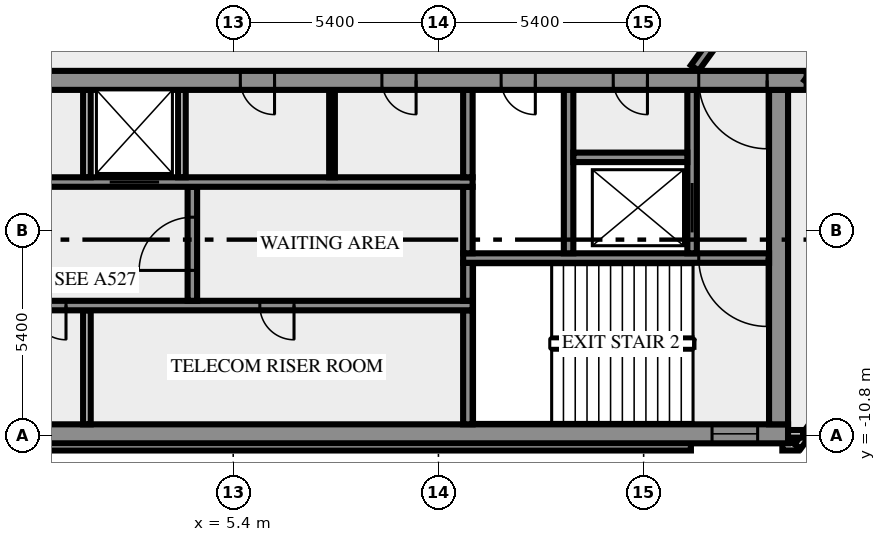
"""IFC4 building model, lengths in metres.
Left out: names, types, materials, properties, quantities, classifications, styles, units other than length and angle.
Written with IfcOpenShell. Run it as: python <this file> out.ifc"""

import sys

from ifc_helpers import new_model, si_unit, direction, frame, frame_2d, origin, place, context, subcontext, project, spatial, rectangle, extrude, element, fill, save


model = new_model("IFC4")
c1 = context("Model", 3, precision=1e-05, world=origin(), true_north=direction((0.0, 1.0)))
c2 = subcontext(c1, "Body", "Model", "MODEL_VIEW")
j1 = project(units=[si_unit("LENGTHUNIT", "METRE"), si_unit("PLANEANGLEUNIT", "RADIAN")], contexts=[c1])
p1 = place(None, origin())
s1 = spatial("IfcSite", under=j1, at=p1, CompositionType="ELEMENT")
p2 = place(p1, origin())
s2 = spatial("IfcBuilding", under=s1, at=p2, CompositionType="ELEMENT")
p3 = place(p2, frame((0.0, 0.0, 347.0)))
s3 = spatial("IfcBuildingStorey", under=s2, at=p3, CompositionType="ELEMENT", Elevation=347.0)
p4 = place(p3, frame((-17.444, -11.088, 0.0), z_axis=(0.0, 0.0, 1.0), x_axis=(1.0, 0.0, 0.0)))
e1 = element("IfcWall", 1, at=p4, inside=s3, PredefinedType="SOLIDWALL", context=c2, shape_type="SweptSolid", body=[
    extrude(rectangle(XDim=34.888, YDim=0.2, at=frame_2d((17.444, 0.0))), origin(), (0.0, 0.0, 1.0), 3.65),
])
p5 = place(p3, frame((19.85, -11.088, 0.0), z_axis=(0.0, 0.0, 1.0), x_axis=(1.0, 0.0, 0.0)))
e2 = element("IfcWall", 2, at=p5, inside=s3, PredefinedType="SOLIDWALL", context=c2, shape_type="SweptSolid", body=[
    extrude(rectangle(XDim=0.406, YDim=0.2, at=frame_2d((0.203, 0.0))), origin(), (0.0, 0.0, 1.0), 3.65),
])
p6 = place(p3, frame((20.253, -11.083, 0.0), z_axis=(0.0, 0.0, 1.0), x_axis=(0.587766567315, 0.809030569476, 0.0)))
e3 = element("IfcWall", 3, at=p6, inside=s3, PredefinedType="SOLIDWALL", context=c2, shape_type="SweptSolid", body=[
    extrude(rectangle(XDim=2.688, YDim=0.2, at=frame_2d((1.344, 0.0))), origin(), (0.0, 0.0, 1.0), 3.65),
])
p7 = place(p3, frame((19.98, -10.75, 0.0), z_axis=(0.0, 0.0, 1.0), x_axis=(1.0, 0.0, 0.0)))
e4 = element("IfcWall", 4, at=p7, inside=s3, PredefinedType="SOLIDWALL", context=c2, shape_type="SweptSolid", body=[
    extrude(rectangle(XDim=0.417, YDim=0.2, at=frame_2d((0.208, 0.0))), origin(), (0.0, 0.0, 1.0), 3.65),
])
p8 = place(p3, frame((-20.0, -10.75, 0.0), z_axis=(0.0, 0.0, 1.0), x_axis=(1.0, 0.0, 0.0)))
e5 = element("IfcWall", 5, at=p8, inside=s3, PredefinedType="SHEAR", context=c2, shape_type="SweptSolid", body=[
    extrude(rectangle(XDim=40.0, YDim=0.5, at=frame_2d((20.0, 0.0))), origin(), (0.0, 0.0, 1.0), 3.65),
])
p9 = place(p8, frame((0.8, 0.0, 1.0)))
e6 = element("IfcOpeningElement", 6, at=p9, cuts=e5, PredefinedType="OPENING", context=c2, shape_type="SweptSolid", body=[
    extrude(rectangle(XDim=1.2, YDim=1.2, at=frame_2d((0.6, 0.6))), frame((0.0, 0.26, 0.0), z_axis=(0.0, -1.0, 0.0), x_axis=(1.0, 0.0, 0.0)), (0.0, 0.0, 1.0), 0.52),
])
p10 = place(p8, frame((38.0, 0.0, 1.0)))
e7 = element("IfcOpeningElement", 7, at=p10, cuts=e5, PredefinedType="OPENING", context=c2, shape_type="SweptSolid", body=[
    extrude(rectangle(XDim=1.2, YDim=1.2, at=frame_2d((0.6, 0.6))), frame((0.0, 0.26, 0.0), z_axis=(0.0, -1.0, 0.0), x_axis=(1.0, 0.0, 0.0)), (0.0, 0.0, 1.0), 0.52),
])
p11 = place(p3, frame((1.55, -10.5, 0.0), z_axis=(0.0, 0.0, 1.0), x_axis=(0.0, 1.0, 0.0)))
e8 = element("IfcWall", 8, at=p11, inside=s3, PredefinedType="SOLIDWALL", context=c2, shape_type="SweptSolid", body=[
    extrude(rectangle(XDim=3.0, YDim=0.2, at=frame_2d((1.5, 0.0))), origin(), (0.0, 0.0, 1.0), 3.65),
])
p12 = place(p3, frame((11.575, -10.5, 0.0), z_axis=(0.0, 0.0, 1.0), x_axis=(0.0, 1.0, 0.0)))
e9 = element("IfcWall", 9, at=p12, inside=s3, PredefinedType="SHEAR", context=c2, shape_type="SweptSolid", body=[
    extrude(rectangle(XDim=3.0, YDim=0.25, at=frame_2d((1.5, 0.0))), origin(), (0.0, 0.0, 1.0), 3.65),
])
p13 = place(p3, frame((19.75, -10.5, 0.0), z_axis=(0.0, 0.0, 1.0), x_axis=(0.0, 1.0, 0.0)))
e10 = element("IfcWall", 10, at=p13, inside=s3, PredefinedType="SHEAR", context=c2, shape_type="SweptSolid", body=[
    extrude(rectangle(XDim=8.8, YDim=0.5, at=frame_2d((4.4, 0.0))), origin(), (0.0, 0.0, 1.0), 3.65),
])
p14 = place(p3, frame((11.7, -7.375, 0.0), z_axis=(0.0, 0.0, 1.0), x_axis=(-1.0, 0.0, 0.0)))
e11 = element("IfcWall", 11, at=p14, inside=s3, PredefinedType="SHEAR", context=c2, shape_type="SweptSolid", body=[
    extrude(rectangle(XDim=23.4, YDim=0.25, at=frame_2d((11.7, 0.0))), origin(), (0.0, 0.0, 1.0), 3.65),
])
p15 = place(p14, frame((22.225, 0.0, 0.0)))
e12 = element("IfcOpeningElement", 12, at=p15, cuts=e11, PredefinedType="OPENING", context=c2, shape_type="SweptSolid", body=[
    extrude(rectangle(XDim=0.8, YDim=2.1, at=frame_2d((0.4, 1.05))), frame((0.0, 0.135, 0.0), z_axis=(0.0, -1.0, 0.0), x_axis=(1.0, 0.0, 0.0)), (0.0, 0.0, 1.0), 0.27),
])
p16 = place(p14, frame((20.2, 0.0, 0.0)))
e13 = element("IfcOpeningElement", 13, at=p16, cuts=e11, PredefinedType="OPENING", context=c2, shape_type="SweptSolid", body=[
    extrude(rectangle(XDim=1.1, YDim=2.1, at=frame_2d((0.55, 1.05))), frame((0.0, 0.135, 0.0), z_axis=(0.0, -1.0, 0.0), x_axis=(1.0, 0.0, 0.0)), (0.0, 0.0, 1.0), 0.27),
])
p17 = place(p14, frame((17.7, 0.0, 0.0)))
e14 = element("IfcOpeningElement", 14, at=p17, cuts=e11, PredefinedType="OPENING", context=c2, shape_type="SweptSolid", body=[
    extrude(rectangle(XDim=1.1, YDim=2.1, at=frame_2d((0.55, 1.05))), frame((0.0, 0.135, 0.0), z_axis=(0.0, -1.0, 0.0), x_axis=(1.0, 0.0, 0.0)), (0.0, 0.0, 1.0), 0.27),
])
p18 = place(p14, frame((15.975, 0.0, 0.0)))
e15 = element("IfcOpeningElement", 15, at=p18, cuts=e11, PredefinedType="OPENING", context=c2, shape_type="SweptSolid", body=[
    extrude(rectangle(XDim=0.8, YDim=2.1, at=frame_2d((0.4, 1.05))), frame((0.0, 0.135, 0.0), z_axis=(0.0, -1.0, 0.0), x_axis=(1.0, 0.0, 0.0)), (0.0, 0.0, 1.0), 0.27),
])
p19 = place(p14, frame((14.65, 0.0, 0.0)))
e16 = element("IfcOpeningElement", 16, at=p19, cuts=e11, PredefinedType="OPENING", context=c2, shape_type="SweptSolid", body=[
    extrude(rectangle(XDim=0.8, YDim=2.1, at=frame_2d((0.4, 1.05))), frame((0.0, 0.135, 0.0), z_axis=(0.0, -1.0, 0.0), x_axis=(1.0, 0.0, 0.0)), (0.0, 0.0, 1.0), 0.27),
])
p20 = place(p14, frame((12.8, 0.0, 0.0)))
e17 = element("IfcOpeningElement", 17, at=p20, cuts=e11, PredefinedType="OPENING", context=c2, shape_type="SweptSolid", body=[
    extrude(rectangle(XDim=0.9, YDim=2.1, at=frame_2d((0.45, 1.05))), frame((0.0, 0.135, 0.0), z_axis=(0.0, -1.0, 0.0), x_axis=(1.0, 0.0, 0.0)), (0.0, 0.0, 1.0), 0.27),
])
p21 = place(p14, frame((10.7, 0.0, 0.0)))
e18 = element("IfcOpeningElement", 18, at=p21, cuts=e11, PredefinedType="OPENING", context=c2, shape_type="SweptSolid", body=[
    extrude(rectangle(XDim=0.9, YDim=2.1, at=frame_2d((0.45, 1.05))), frame((0.0, 0.135, 0.0), z_axis=(0.0, -1.0, 0.0), x_axis=(1.0, 0.0, 0.0)), (0.0, 0.0, 1.0), 0.27),
])
p22 = place(p14, frame((4.7, 0.0, 0.0)))
e19 = element("IfcOpeningElement", 19, at=p22, cuts=e11, PredefinedType="OPENING", context=c2, shape_type="SweptSolid", body=[
    extrude(rectangle(XDim=0.9, YDim=2.1, at=frame_2d((0.45, 1.05))), frame((0.0, 0.135, 0.0), z_axis=(0.0, -1.0, 0.0), x_axis=(1.0, 0.0, 0.0)), (0.0, 0.0, 1.0), 0.27),
])
p23 = place(p3, frame((4.325, -7.25, 0.0), z_axis=(0.0, 0.0, 1.0), x_axis=(0.0, 1.0, 0.0)))
e20 = element("IfcWall", 20, at=p23, inside=s3, PredefinedType="SHEAR", context=c2, shape_type="SweptSolid", body=[
    extrude(rectangle(XDim=3.0, YDim=0.25, at=frame_2d((1.5, 0.0))), origin(), (0.0, 0.0, 1.0), 3.65),
])
p24 = place(p23, frame((0.8, 0.0, 0.0)))
e21 = element("IfcOpeningElement", 21, at=p24, cuts=e20, PredefinedType="OPENING", context=c2, shape_type="SweptSolid", body=[
    extrude(rectangle(XDim=1.4, YDim=2.1, at=frame_2d((0.7, 1.05))), frame((0.0, 0.135, 0.0), z_axis=(0.0, -1.0, 0.0), x_axis=(1.0, 0.0, 0.0)), (0.0, 0.0, 1.0), 0.27),
])
p25 = place(p3, frame((11.575, -7.25, 0.0), z_axis=(0.0, 0.0, 1.0), x_axis=(0.0, 1.0, 0.0)))
e22 = element("IfcWall", 22, at=p25, inside=s3, PredefinedType="SHEAR", context=c2, shape_type="SweptSolid", body=[
    extrude(rectangle(XDim=1.0, YDim=0.25, at=frame_2d((0.5, 0.0))), origin(), (0.0, 0.0, 1.0), 3.65),
])
p26 = place(p3, frame((19.5, -6.125, 0.0), z_axis=(0.0, 0.0, 1.0), x_axis=(-1.0, 0.0, 0.0)))
e23 = element("IfcWall", 23, at=p26, inside=s3, PredefinedType="SHEAR", context=c2, shape_type="SweptSolid", body=[
    extrude(rectangle(XDim=8.05, YDim=0.25, at=frame_2d((4.025, 0.0))), origin(), (0.0, 0.0, 1.0), 3.65),
])
p27 = place(p26, frame((0.05, 0.0, 0.0)))
e24 = element("IfcOpeningElement", 24, at=p27, cuts=e23, PredefinedType="OPENING", context=c2, shape_type="SweptSolid", body=[
    extrude(rectangle(XDim=1.8, YDim=2.1, at=frame_2d((0.9, 1.05))), frame((0.0, 0.135, 0.0), z_axis=(0.0, -1.0, 0.0), x_axis=(1.0, 0.0, 0.0)), (0.0, 0.0, 1.0), 0.27),
])
p28 = place(p3, frame((11.575, -6.0, 0.0), z_axis=(0.0, 0.0, 1.0), x_axis=(0.0, 1.0, 0.0)))
e25 = element("IfcWall", 25, at=p28, inside=s3, PredefinedType="SHEAR", context=c2, shape_type="SweptSolid", body=[
    extrude(rectangle(XDim=1.75, YDim=0.25, at=frame_2d((0.875, 0.0))), origin(), (0.0, 0.0, 1.0), 3.65),
])
p29 = place(p3, frame((14.225, -6.0, 0.0), z_axis=(0.0, 0.0, 1.0), x_axis=(0.0, 1.0, 0.0)))
e26 = element("IfcWall", 26, at=p29, inside=s3, PredefinedType="SHEAR", context=c2, shape_type="SweptSolid", body=[
    extrude(rectangle(XDim=4.3, YDim=0.25, at=frame_2d((2.15, 0.0))), origin(), (0.0, 0.0, 1.0), 3.65),
])
p30 = place(p3, frame((17.475, -6.0, 0.0), z_axis=(0.0, 0.0, 1.0), x_axis=(0.0, 1.0, 0.0)))
e27 = element("IfcWall", 27, at=p30, inside=s3, PredefinedType="SHEAR", context=c2, shape_type="SweptSolid", body=[
    extrude(rectangle(XDim=4.3, YDim=0.25, at=frame_2d((2.15, 0.0))), origin(), (0.0, 0.0, 1.0), 3.65),
])
p31 = place(p30, frame((0.55, 0.0, 0.0)))
e28 = element("IfcOpeningElement", 28, at=p31, cuts=e27, PredefinedType="OPENING", context=c2, shape_type="SweptSolid", body=[
    extrude(rectangle(XDim=1.3, YDim=2.1, at=frame_2d((0.65, 1.05))), frame((0.0, 0.135, 0.0), z_axis=(0.0, -1.0, 0.0), x_axis=(1.0, 0.0, 0.0)), (0.0, 0.0, 1.0), 0.27),
])
p32 = place(p3, frame((-0.6, -4.125, 0.0), z_axis=(0.0, 0.0, 1.0), x_axis=(1.0, 0.0, 0.0)))
e29 = element("IfcWall", 29, at=p32, inside=s3, PredefinedType="SHEAR", context=c2, shape_type="SweptSolid", body=[
    extrude(rectangle(XDim=12.3, YDim=0.25, at=frame_2d((6.15, 0.0))), origin(), (0.0, 0.0, 1.0), 3.65),
])
p33 = place(p32, frame((2.75, 0.0, 0.0)))
e30 = element("IfcOpeningElement", 30, at=p33, cuts=e29, PredefinedType="OPENING", context=c2, shape_type="SweptSolid", body=[
    extrude(rectangle(XDim=1.3, YDim=2.1, at=frame_2d((0.65, 1.05))), frame((0.0, 0.135, 0.0), z_axis=(0.0, -1.0, 0.0), x_axis=(1.0, 0.0, 0.0)), (0.0, 0.0, 1.0), 0.27),
])
for number, where, z_axis, x_axis in (
    (31, (1.55, -4.0, 0.0), (0.0, 0.0, 1.0), (0.0, 1.0, 0.0)),
    (32, (4.05, -4.0, 0.0), (0.0, 0.0, 1.0), (0.0, 1.0, 0.0)),
):
    element("IfcWall", number, at=place(p3, frame(where, z_axis=z_axis, x_axis=x_axis)), inside=s3, PredefinedType="SOLIDWALL", context=c2, shape_type="SweptSolid", body=[
        extrude(rectangle(XDim=2.3, YDim=0.2, at=frame_2d((1.15, 0.0))), origin(), (0.0, 0.0, 1.0), 3.65),
    ])
p34 = place(p3, frame((8.0, -4.0, 0.0), z_axis=(0.0, 0.0, 1.0), x_axis=(0.0, 1.0, 0.0)))
e33 = element("IfcWall", 33, at=p34, inside=s3, PredefinedType="PARTITIONING", context=c2, shape_type="SweptSolid", body=[
    extrude(rectangle(XDim=2.3, YDim=0.15, at=frame_2d((1.15, 0.0))), origin(), (0.0, 0.0, 1.0), 3.65),
])
p35 = place(p3, frame((11.575, -4.0, 0.0), z_axis=(0.0, 0.0, 1.0), x_axis=(0.0, 1.0, 0.0)))
e34 = element("IfcWall", 34, at=p35, inside=s3, PredefinedType="SHEAR", context=c2, shape_type="SweptSolid", body=[
    extrude(rectangle(XDim=2.3, YDim=0.25, at=frame_2d((1.15, 0.0))), origin(), (0.0, 0.0, 1.0), 3.65),
])
p36 = place(p3, frame((14.35, -3.475, 0.0), z_axis=(0.0, 0.0, 1.0), x_axis=(1.0, 0.0, 0.0)))
e35 = element("IfcWall", 35, at=p36, inside=s3, PredefinedType="SHEAR", context=c2, shape_type="SweptSolid", body=[
    extrude(rectangle(XDim=3.0, YDim=0.25, at=frame_2d((1.5, 0.0))), origin(), (0.0, 0.0, 1.0), 3.65),
])
p37 = place(p3, frame((20.49, -1.45, 0.0), z_axis=(0.0, 0.0, 1.0), x_axis=(-1.0, 0.0, 0.0)))
e36 = element("IfcWall", 36, at=p37, inside=s3, PredefinedType="SHEAR", context=c2, shape_type="SweptSolid", body=[
    extrude(rectangle(XDim=40.98, YDim=0.5, at=frame_2d((20.49, 0.0))), origin(), (0.0, 0.0, 1.0), 3.65),
])
p38 = place(p37, frame((38.14, 0.0, 0.0)))
e37 = element("IfcOpeningElement", 37, at=p38, cuts=e36, PredefinedType="OPENING", context=c2, shape_type="SweptSolid", body=[
    extrude(rectangle(XDim=1.8, YDim=2.1, at=frame_2d((0.9, 1.05))), frame((0.0, 0.26, 0.0), z_axis=(0.0, -1.0, 0.0), x_axis=(1.0, 0.0, 0.0)), (0.0, 0.0, 1.0), 0.52),
])
p39 = place(p37, frame((36.728, 0.0, 0.0)))
e38 = element("IfcOpeningElement", 38, at=p39, cuts=e36, PredefinedType="OPENING", context=c2, shape_type="SweptSolid", body=[
    extrude(rectangle(XDim=0.8, YDim=2.1, at=frame_2d((0.4, 1.05))), frame((0.0, 0.26, 0.0), z_axis=(0.0, -1.0, 0.0), x_axis=(1.0, 0.0, 0.0)), (0.0, 0.0, 1.0), 0.52),
])
p40 = place(p37, frame((35.153, 0.0, 0.0)))
e39 = element("IfcOpeningElement", 39, at=p40, cuts=e36, PredefinedType="OPENING", context=c2, shape_type="SweptSolid", body=[
    extrude(rectangle(XDim=0.8, YDim=2.1, at=frame_2d((0.4, 1.05))), frame((0.0, 0.26, 0.0), z_axis=(0.0, -1.0, 0.0), x_axis=(1.0, 0.0, 0.0)), (0.0, 0.0, 1.0), 0.52),
])
p41 = place(p37, frame((32.94, 0.0, 0.0)))
e40 = element("IfcOpeningElement", 40, at=p41, cuts=e36, PredefinedType="OPENING", context=c2, shape_type="SweptSolid", body=[
    extrude(rectangle(XDim=0.9, YDim=2.1, at=frame_2d((0.45, 1.05))), frame((0.0, 0.26, 0.0), z_axis=(0.0, -1.0, 0.0), x_axis=(1.0, 0.0, 0.0)), (0.0, 0.0, 1.0), 0.52),
])
p42 = place(p37, frame((31.015, 0.0, 0.0)))
e41 = element("IfcOpeningElement", 41, at=p42, cuts=e36, PredefinedType="OPENING", context=c2, shape_type="SweptSolid", body=[
    extrude(rectangle(XDim=0.8, YDim=2.1, at=frame_2d((0.4, 1.05))), frame((0.0, 0.26, 0.0), z_axis=(0.0, -1.0, 0.0), x_axis=(1.0, 0.0, 0.0)), (0.0, 0.0, 1.0), 0.52),
])
p43 = place(p37, frame((24.765, 0.0, 0.0)))
e42 = element("IfcOpeningElement", 42, at=p43, cuts=e36, PredefinedType="OPENING", context=c2, shape_type="SweptSolid", body=[
    extrude(rectangle(XDim=0.8, YDim=2.1, at=frame_2d((0.4, 1.05))), frame((0.0, 0.26, 0.0), z_axis=(0.0, -1.0, 0.0), x_axis=(1.0, 0.0, 0.0)), (0.0, 0.0, 1.0), 0.52),
])
p44 = place(p37, frame((21.765, 0.0, 0.0)))
e43 = element("IfcOpeningElement", 43, at=p44, cuts=e36, PredefinedType="OPENING", context=c2, shape_type="SweptSolid", body=[
    extrude(rectangle(XDim=2.0, YDim=2.1, at=frame_2d((1.0, 1.05))), frame((0.0, 0.26, 0.0), z_axis=(0.0, -1.0, 0.0), x_axis=(1.0, 0.0, 0.0)), (0.0, 0.0, 1.0), 0.52),
])
p45 = place(p37, frame((14.002, 0.0, 0.0)))
e44 = element("IfcOpeningElement", 44, at=p45, cuts=e36, PredefinedType="OPENING", context=c2, shape_type="SweptSolid", body=[
    extrude(rectangle(XDim=0.9, YDim=2.1, at=frame_2d((0.45, 1.05))), frame((0.0, 0.26, 0.0), z_axis=(0.0, -1.0, 0.0), x_axis=(1.0, 0.0, 0.0)), (0.0, 0.0, 1.0), 0.52),
])
p46 = place(p37, frame((10.278, 0.0, 0.0)))
e45 = element("IfcOpeningElement", 45, at=p46, cuts=e36, PredefinedType="OPENING", context=c2, shape_type="SweptSolid", body=[
    extrude(rectangle(XDim=0.9, YDim=2.1, at=frame_2d((0.45, 1.05))), frame((0.0, 0.26, 0.0), z_axis=(0.0, -1.0, 0.0), x_axis=(1.0, 0.0, 0.0)), (0.0, 0.0, 1.0), 0.52),
])
p47 = place(p37, frame((7.14, 0.0, 0.0)))
e46 = element("IfcOpeningElement", 46, at=p47, cuts=e36, PredefinedType="OPENING", context=c2, shape_type="SweptSolid", body=[
    extrude(rectangle(XDim=0.9, YDim=2.1, at=frame_2d((0.45, 1.05))), frame((0.0, 0.26, 0.0), z_axis=(0.0, -1.0, 0.0), x_axis=(1.0, 0.0, 0.0)), (0.0, 0.0, 1.0), 0.52),
])
p48 = place(p37, frame((4.19, 0.0, 0.0)))
e47 = element("IfcOpeningElement", 47, at=p48, cuts=e36, PredefinedType="OPENING", context=c2, shape_type="SweptSolid", body=[
    extrude(rectangle(XDim=0.9, YDim=2.1, at=frame_2d((0.45, 1.05))), frame((0.0, 0.26, 0.0), z_axis=(0.0, -1.0, 0.0), x_axis=(1.0, 0.0, 0.0)), (0.0, 0.0, 1.0), 0.52),
])
p49 = place(p37, frame((1.04, 0.0, 0.0)))
e48 = element("IfcOpeningElement", 48, at=p49, cuts=e36, PredefinedType="OPENING", context=c2, shape_type="SweptSolid", body=[
    extrude(rectangle(XDim=1.8, YDim=2.1, at=frame_2d((0.9, 1.05))), frame((0.0, 0.26, 0.0), z_axis=(0.0, -1.0, 0.0), x_axis=(1.0, 0.0, 0.0)), (0.0, 0.0, 1.0), 0.52),
])
p50 = place(p3, frame((17.545, -1.125, 0.0), z_axis=(0.0, 0.0, 1.0), x_axis=(0.58779555165, 0.809009511354, 0.0)))
e49 = element("IfcWall", 49, at=p50, inside=s3, PredefinedType="SOLIDWALL", context=c2, shape_type="SweptSolid", body=[
    extrude(rectangle(XDim=18.103, YDim=0.25, at=frame_2d((9.052, 0.0))), origin(), (0.0, 0.0, 1.0), 3.65),
])
p51 = place(p50, frame((16.728, 0.0, 0.0)))
e50 = element("IfcOpeningElement", 50, at=p51, cuts=e49, PredefinedType="OPENING", context=c2, shape_type="SweptSolid", body=[
    extrude(rectangle(XDim=0.9, YDim=2.1, at=frame_2d((0.45, 1.05))), frame((0.0, 0.135, 0.0), z_axis=(0.0, -1.0, 0.0), x_axis=(1.0, 0.0, 0.0)), (0.0, 0.0, 1.0), 0.27),
])
p52 = place(p3, frame((30.183, 11.761, 0.0), z_axis=(0.0, 0.0, 1.0), x_axis=(-0.587781762867, -0.80901952958, 0.0)))
e51 = element("IfcWall", 51, at=p52, inside=s3, PredefinedType="SOLIDWALL", context=c2, shape_type="SweptSolid", body=[
    extrude(rectangle(XDim=16.42, YDim=0.25, at=frame_2d((8.21, 0.0))), origin(), (0.0, 0.0, 1.0), 3.65),
])
p53 = place(p52, frame((0.225, 0.0, 0.0)))
e52 = element("IfcOpeningElement", 52, at=p53, cuts=e51, PredefinedType="OPENING", context=c2, shape_type="SweptSolid", body=[
    extrude(rectangle(XDim=0.9, YDim=2.1, at=frame_2d((0.45, 1.05))), frame((0.0, 0.135, 0.0), z_axis=(0.0, -1.0, 0.0), x_axis=(1.0, 0.0, 0.0)), (0.0, 0.0, 1.0), 0.27),
])
p54 = place(p52, frame((6.605, 0.0, 0.0)))
e53 = element("IfcOpeningElement", 53, at=p54, cuts=e51, PredefinedType="OPENING", context=c2, shape_type="SweptSolid", body=[
    extrude(rectangle(XDim=0.9, YDim=2.1, at=frame_2d((0.45, 1.05))), frame((0.0, 0.135, 0.0), z_axis=(0.0, -1.0, 0.0), x_axis=(1.0, 0.0, 0.0)), (0.0, 0.0, 1.0), 0.27),
])
p55 = place(p10, origin())
e54 = element("IfcWindow", 54, at=p55, inside=s3, PartitioningType="SINGLE_PANEL", PredefinedType="WINDOW", context=c2, shape_type="SweptSolid", body=[
    extrude(rectangle(XDim=1.2, YDim=1.2, at=frame_2d((0.6, 0.6))), frame((0.0, 0.03, 0.0), z_axis=(0.0, -1.0, 0.0), x_axis=(1.0, 0.0, 0.0)), (0.0, 0.0, 1.0), 0.06),
])
fill(e7, e54)
p56 = place(p21, origin())
e55 = element("IfcDoor", 55, at=p56, inside=s3, OperationType="SINGLE_SWING_LEFT", PredefinedType="DOOR", context=c2, shape_type="SweptSolid", body=[
    extrude(rectangle(XDim=0.9, YDim=2.1, at=frame_2d((0.45, 1.05))), frame((0.0, 0.025, 0.0), z_axis=(0.0, -1.0, 0.0), x_axis=(1.0, 0.0, 0.0)), (0.0, 0.0, 1.0), 0.05),
])
fill(e18, e55)
p57 = place(p22, origin())
e56 = element("IfcDoor", 56, at=p57, inside=s3, OperationType="SINGLE_SWING_LEFT", PredefinedType="DOOR", context=c2, shape_type="SweptSolid", body=[
    extrude(rectangle(XDim=0.9, YDim=2.1, at=frame_2d((0.45, 1.05))), frame((0.0, 0.025, 0.0), z_axis=(0.0, -1.0, 0.0), x_axis=(1.0, 0.0, 0.0)), (0.0, 0.0, 1.0), 0.05),
])
fill(e19, e56)
p58 = place(p24, origin())
e57 = element("IfcDoor", 57, at=p58, inside=s3, OperationType="DOUBLE_DOOR_SINGLE_SWING", PredefinedType="DOOR", context=c2, shape_type="SweptSolid", body=[
    extrude(rectangle(XDim=1.4, YDim=2.1, at=frame_2d((0.7, 1.05))), frame((0.0, 0.025, 0.0), z_axis=(0.0, -1.0, 0.0), x_axis=(1.0, 0.0, 0.0)), (0.0, 0.0, 1.0), 0.05),
])
fill(e21, e57)
p59 = place(p27, origin())
e58 = element("IfcDoor", 58, at=p59, inside=s3, OperationType="DOUBLE_DOOR_SINGLE_SWING", PredefinedType="DOOR", context=c2, shape_type="SweptSolid", body=[
    extrude(rectangle(XDim=1.8, YDim=2.1, at=frame_2d((0.9, 1.05))), frame((0.0, 0.025, 0.0), z_axis=(0.0, -1.0, 0.0), x_axis=(1.0, 0.0, 0.0)), (0.0, 0.0, 1.0), 0.05),
])
fill(e24, e58)
p60 = place(p31, origin())
e59 = element("IfcDoor", 59, at=p60, inside=s3, OperationType="DOUBLE_DOOR_SLIDING", PredefinedType="DOOR", context=c2, shape_type="SweptSolid", body=[
    extrude(rectangle(XDim=1.3, YDim=2.1, at=frame_2d((0.65, 1.05))), frame((0.0, 0.025, 0.0), z_axis=(0.0, -1.0, 0.0), x_axis=(1.0, 0.0, 0.0)), (0.0, 0.0, 1.0), 0.05),
])
fill(e28, e59)
p61 = place(p33, origin())
e60 = element("IfcDoor", 60, at=p61, inside=s3, OperationType="DOUBLE_DOOR_SLIDING", PredefinedType="DOOR", context=c2, shape_type="SweptSolid", body=[
    extrude(rectangle(XDim=1.3, YDim=2.1, at=frame_2d((0.65, 1.05))), frame((0.0, 0.025, 0.0), z_axis=(0.0, -1.0, 0.0), x_axis=(1.0, 0.0, 0.0)), (0.0, 0.0, 1.0), 0.05),
])
fill(e30, e60)
p62 = place(p45, origin())
e61 = element("IfcDoor", 61, at=p62, inside=s3, OperationType="SINGLE_SWING_LEFT", PredefinedType="DOOR", context=c2, shape_type="SweptSolid", body=[
    extrude(rectangle(XDim=0.9, YDim=2.1, at=frame_2d((0.45, 1.05))), frame((0.0, 0.025, 0.0), z_axis=(0.0, -1.0, 0.0), x_axis=(1.0, 0.0, 0.0)), (0.0, 0.0, 1.0), 0.05),
])
fill(e44, e61)
p63 = place(p46, origin())
e62 = element("IfcDoor", 62, at=p63, inside=s3, OperationType="SINGLE_SWING_LEFT", PredefinedType="DOOR", context=c2, shape_type="SweptSolid", body=[
    extrude(rectangle(XDim=0.9, YDim=2.1, at=frame_2d((0.45, 1.05))), frame((0.0, 0.025, 0.0), z_axis=(0.0, -1.0, 0.0), x_axis=(1.0, 0.0, 0.0)), (0.0, 0.0, 1.0), 0.05),
])
fill(e45, e62)
p64 = place(p47, origin())
e63 = element("IfcDoor", 63, at=p64, inside=s3, OperationType="SINGLE_SWING_LEFT", PredefinedType="DOOR", context=c2, shape_type="SweptSolid", body=[
    extrude(rectangle(XDim=0.9, YDim=2.1, at=frame_2d((0.45, 1.05))), frame((0.0, 0.025, 0.0), z_axis=(0.0, -1.0, 0.0), x_axis=(1.0, 0.0, 0.0)), (0.0, 0.0, 1.0), 0.05),
])
fill(e46, e63)
p65 = place(p48, origin())
e64 = element("IfcDoor", 64, at=p65, inside=s3, OperationType="SINGLE_SWING_LEFT", PredefinedType="DOOR", context=c2, shape_type="SweptSolid", body=[
    extrude(rectangle(XDim=0.9, YDim=2.1, at=frame_2d((0.45, 1.05))), frame((0.0, 0.025, 0.0), z_axis=(0.0, -1.0, 0.0), x_axis=(1.0, 0.0, 0.0)), (0.0, 0.0, 1.0), 0.05),
])
fill(e47, e64)
p66 = place(p49, origin())
e65 = element("IfcDoor", 65, at=p66, inside=s3, OperationType="DOUBLE_DOOR_SINGLE_SWING", PredefinedType="DOOR", context=c2, shape_type="SweptSolid", body=[
    extrude(rectangle(XDim=1.8, YDim=2.1, at=frame_2d((0.9, 1.05))), frame((0.0, 0.025, 0.0), z_axis=(0.0, -1.0, 0.0), x_axis=(1.0, 0.0, 0.0)), (0.0, 0.0, 1.0), 0.05),
])
fill(e48, e65)
save(model, sys.argv[1])
